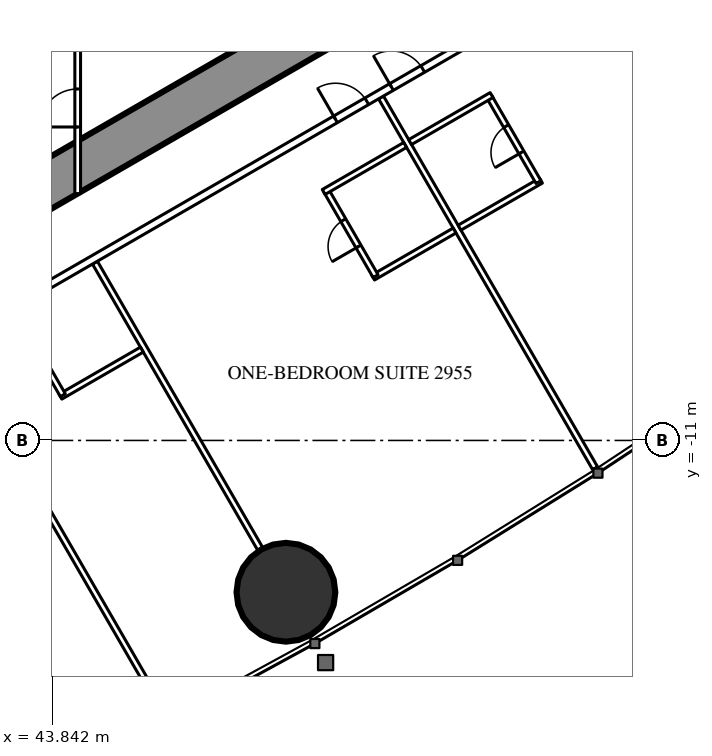
"""IFC4 building model, lengths in metres.
Left out: names, types, materials, properties, quantities, classifications, styles, units other than length and angle.
Written with IfcOpenShell. Run it as: python <this file> out.ifc"""

import sys

from ifc_helpers import new_model, si_unit, direction, frame, frame_2d, origin, origin_2d, place, context, subcontext, project, spatial, rectangle, hollow_circle, extrude, element, fill, save


model = new_model("IFC4")
c1 = context("Model", 3, precision=1e-05, world=origin(), true_north=direction((0.0, 1.0)))
c2 = subcontext(c1, "Body", "Model", "MODEL_VIEW")
j1 = project(units=[si_unit("LENGTHUNIT", "METRE"), si_unit("PLANEANGLEUNIT", "RADIAN")], contexts=[c1])
p1 = place(None, origin())
s1 = spatial("IfcSite", under=j1, at=p1, CompositionType="ELEMENT")
p2 = place(p1, origin())
s2 = spatial("IfcBuilding", under=s1, at=p2, CompositionType="ELEMENT")
p3 = place(p2, frame((0.0, 0.0, 111.6)))
s3 = spatial("IfcBuildingStorey", under=s2, at=p3, CompositionType="ELEMENT", Elevation=111.6)
p4 = place(p3, frame((49.979, -14.994, 0.0), z_axis=(0.0, 0.0, 1.0), x_axis=(1.0, 0.0, 0.0)))
e1 = element("IfcColumn", 1, at=p4, inside=s3, PredefinedType="COLUMN", context=c2, shape_type="SweptSolid", body=[
    extrude(hollow_circle(Radius=1.3, WallThickness=0.1, at=origin_2d()), origin(), (0.0, 0.0, 1.0), 3.5),
])
p5 = place(p3, frame((27.2, -13.8, 0.0), z_axis=(0.0, 0.0, 1.0), x_axis=(0.866027159892, 0.499996958321, 0.0)))
e2 = element("IfcWall", 2, at=p5, inside=s3, PredefinedType="SHEAR", context=c2, shape_type="SweptSolid", body=[
    extrude(rectangle(XDim=27.947, YDim=1.2, at=frame_2d((13.973, 0.0))), origin(), (0.0, 0.0, 1.0), 3.5),
])
p6 = place(p5, frame((4.6, 0.0, 0.0)))
e3 = element("IfcOpeningElement", 3, at=p6, cuts=e2, PredefinedType="OPENING", context=c2, shape_type="SweptSolid", body=[
    extrude(rectangle(XDim=1.0, YDim=2.2, at=frame_2d((0.5, 1.1))), frame((0.0, 0.61, 0.0), z_axis=(0.0, -1.0, 0.0), x_axis=(1.0, 0.0, 0.0)), (0.0, 0.0, 1.0), 1.22),
])
p7 = place(p5, frame((13.395, 0.0, 0.0)))
e4 = element("IfcOpeningElement", 4, at=p7, cuts=e2, PredefinedType="OPENING", context=c2, shape_type="SweptSolid", body=[
    extrude(rectangle(XDim=1.8, YDim=2.2, at=frame_2d((0.9, 1.1))), frame((0.0, 0.61, 0.0), z_axis=(0.0, -1.0, 0.0), x_axis=(1.0, 0.0, 0.0)), (0.0, 0.0, 1.0), 1.22),
])
p8 = place(p3, frame((41.19, -8.494, 0.0), z_axis=(0.0, 0.0, 1.0), x_axis=(0.49999258054, -0.866029687369, 0.0)))
e5 = element("IfcWall", 5, at=p8, inside=s3, PredefinedType="PARTITIONING", context=c2, shape_type="SweptSolid", body=[
    extrude(rectangle(XDim=11.318, YDim=0.15, at=frame_2d((5.659, 0.0))), origin(), (0.0, 0.0, 1.0), 3.25),
])
p9 = place(p3, frame((44.954, -6.321, 0.0), z_axis=(0.0, 0.0, 1.0), x_axis=(0.500018676722, -0.866014620505, 0.0)))
e6 = element("IfcWall", 6, at=p9, inside=s3, PredefinedType="PARTITIONING", context=c2, shape_type="SweptSolid", body=[
    extrude(rectangle(XDim=8.704, YDim=0.15, at=frame_2d((4.352, 0.0))), origin(), (0.0, 0.0, 1.0), 2.2),
])
p10 = place(p3, frame((52.481, -1.975, 0.0), z_axis=(0.0, 0.0, 1.0), x_axis=(0.500003867771, -0.866023170714, 0.0)))
e7 = element("IfcWall", 7, at=p10, inside=s3, PredefinedType="PARTITIONING", context=c2, shape_type="SweptSolid", body=[
    extrude(rectangle(XDim=11.265, YDim=0.15, at=frame_2d((5.632, 0.0))), origin(), (0.0, 0.0, 1.0), 3.25),
])
p11 = place(p3, frame((37.96, -10.243, 0.0), z_axis=(0.0, 0.0, 1.0), x_axis=(0.866026429433, 0.499998223521, 0.0)))
e8 = element("IfcWall", 8, at=p11, inside=s3, PredefinedType="PARTITIONING", context=c2, shape_type="SweptSolid", body=[
    extrude(rectangle(XDim=20.487, YDim=0.2, at=frame_2d((10.243, 0.0))), origin(), (0.0, 0.0, 1.0), 3.25),
])
p12 = place(p11, frame((4.343, 0.0, 0.0)))
e9 = element("IfcOpeningElement", 9, at=p12, cuts=e8, PredefinedType="OPENING", context=c2, shape_type="SweptSolid", body=[
    extrude(rectangle(XDim=0.95, YDim=2.2, at=frame_2d((0.475, 1.1))), frame((0.0, 0.11, 0.0), z_axis=(0.0, -1.0, 0.0), x_axis=(1.0, 0.0, 0.0)), (0.0, 0.0, 1.0), 0.22),
])
p13 = place(p11, frame((15.385, 0.0, 0.0)))
e10 = element("IfcOpeningElement", 10, at=p13, cuts=e8, PredefinedType="OPENING", context=c2, shape_type="SweptSolid", body=[
    extrude(rectangle(XDim=0.95, YDim=2.2, at=frame_2d((0.475, 1.1))), frame((0.0, 0.11, 0.0), z_axis=(0.0, -1.0, 0.0), x_axis=(1.0, 0.0, 0.0)), (0.0, 0.0, 1.0), 0.22),
])
p14 = place(p11, frame((17.085, 0.0, 0.0)))
e11 = element("IfcOpeningElement", 11, at=p14, cuts=e8, PredefinedType="OPENING", context=c2, shape_type="SweptSolid", body=[
    extrude(rectangle(XDim=0.95, YDim=2.2, at=frame_2d((0.475, 1.1))), frame((0.0, 0.11, 0.0), z_axis=(0.0, -1.0, 0.0), x_axis=(1.0, 0.0, 0.0)), (0.0, 0.0, 1.0), 0.22),
])
p15 = place(p11, frame((1.048, 0.0, 0.0)))
e12 = element("IfcOpeningElement", 12, at=p15, cuts=e8, PredefinedType="OPENING", context=c2, shape_type="SweptSolid", body=[
    extrude(rectangle(XDim=1.8, YDim=2.2, at=frame_2d((0.9, 1.1))), frame((0.0, 0.11, 0.0), z_axis=(0.0, -1.0, 0.0), x_axis=(1.0, 0.0, 0.0)), (0.0, 0.0, 1.0), 0.22),
])
p16 = place(p3, frame((44.045, -9.848, 0.0), z_axis=(0.0, 0.0, 1.0), x_axis=(0.866031185235, 0.4999899861, 0.0)))
e13 = element("IfcWall", 13, at=p16, inside=s3, PredefinedType="PARTITIONING", context=c2, shape_type="SweptSolid", body=[
    extrude(rectangle(XDim=2.475, YDim=0.15, at=frame_2d((1.238, 0.0))), origin(), (0.0, 0.0, 1.0), 3.25),
])
p17 = place(p3, frame((42.81, -7.559, 0.0), z_axis=(0.0, 0.0, 1.0), x_axis=(0.499936506574, -0.866062058628, 0.0)))
e14 = element("IfcWall", 14, at=p17, inside=s3, PredefinedType="PARTITIONING", context=c2, shape_type="SweptSolid", body=[
    extrude(rectangle(XDim=2.6, YDim=0.15, at=frame_2d((1.3, 0.0))), origin(), (0.0, 0.0, 1.0), 3.25),
])
p18 = place(p17, frame((0.9, 0.0, 0.0)))
e15 = element("IfcOpeningElement", 15, at=p18, cuts=e14, PredefinedType="OPENING", context=c2, shape_type="SweptSolid", body=[
    extrude(rectangle(XDim=0.8, YDim=2.2, at=frame_2d((0.4, 1.1))), frame((0.0, 0.085, 0.0), z_axis=(0.0, -1.0, 0.0), x_axis=(1.0, 0.0, 0.0)), (0.0, 0.0, 1.0), 0.17),
])
p19 = place(p3, frame((52.273, -6.714, 0.0), z_axis=(0.0, 0.0, 1.0), x_axis=(0.866031185235, 0.4999899861, 0.0)))
e16 = element("IfcWall", 16, at=p19, inside=s3, PredefinedType="PARTITIONING", context=c2, shape_type="SweptSolid", body=[
    extrude(rectangle(XDim=2.475, YDim=0.15, at=frame_2d((1.238, 0.0))), origin(), (0.0, 0.0, 1.0), 3.25),
])
p20 = place(p3, frame((51.038, -4.425, 0.0), z_axis=(0.0, 0.0, 1.0), x_axis=(0.49997716683, -0.86603858612, 0.0)))
e17 = element("IfcWall", 17, at=p20, inside=s3, PredefinedType="PARTITIONING", context=c2, shape_type="SweptSolid", body=[
    extrude(rectangle(XDim=2.6, YDim=0.15, at=frame_2d((1.3, 0.0))), origin(), (0.0, 0.0, 1.0), 3.25),
])
p21 = place(p20, frame((0.9, 0.0, 0.0)))
e18 = element("IfcOpeningElement", 18, at=p21, cuts=e17, PredefinedType="OPENING", context=c2, shape_type="SweptSolid", body=[
    extrude(rectangle(XDim=0.8, YDim=2.2, at=frame_2d((0.4, 1.1))), frame((0.0, 0.085, 0.0), z_axis=(0.0, -1.0, 0.0), x_axis=(1.0, 0.0, 0.0)), (0.0, 0.0, 1.0), 0.17),
])
p22 = place(p3, frame((50.973, -4.462, 0.0), z_axis=(0.0, 0.0, 1.0), x_axis=(0.866031185235, 0.4999899861, 0.0)))
e19 = element("IfcWall", 19, at=p22, inside=s3, PredefinedType="PARTITIONING", context=c2, shape_type="SweptSolid", body=[
    extrude(rectangle(XDim=2.475, YDim=0.15, at=frame_2d((1.238, 0.0))), origin(), (0.0, 0.0, 1.0), 3.25),
])
p23 = place(p3, frame((54.546, -5.402, 0.0), z_axis=(0.0, 0.0, 1.0), x_axis=(0.866006523861, 0.500032699561, 0.0)))
e20 = element("IfcWall", 20, at=p23, inside=s3, PredefinedType="PARTITIONING", context=c2, shape_type="SweptSolid", body=[
    extrude(rectangle(XDim=2.475, YDim=0.15, at=frame_2d((1.237, 0.0))), origin(), (0.0, 0.0, 1.0), 3.25),
])
p24 = place(p3, frame((55.325, -1.95, 0.0), z_axis=(0.0, 0.0, 1.0), x_axis=(0.500006934395, -0.866021400173, 0.0)))
e21 = element("IfcWall", 21, at=p24, inside=s3, PredefinedType="PARTITIONING", context=c2, shape_type="SweptSolid", body=[
    extrude(rectangle(XDim=2.6, YDim=0.15, at=frame_2d((1.3, 0.0))), origin(), (0.0, 0.0, 1.0), 3.25),
])
p25 = place(p24, frame((0.9, 0.0, 0.0)))
e22 = element("IfcOpeningElement", 22, at=p25, cuts=e21, PredefinedType="OPENING", context=c2, shape_type="SweptSolid", body=[
    extrude(rectangle(XDim=0.8, YDim=2.2, at=frame_2d((0.4, 1.1))), frame((0.0, 0.085, 0.0), z_axis=(0.0, -1.0, 0.0), x_axis=(1.0, 0.0, 0.0)), (0.0, 0.0, 1.0), 0.17),
])
p26 = place(p3, frame((53.246, -3.15, 0.0), z_axis=(0.0, 0.0, 1.0), x_axis=(0.866006523861, 0.500032699561, 0.0)))
e23 = element("IfcWall", 23, at=p26, inside=s3, PredefinedType="PARTITIONING", context=c2, shape_type="SweptSolid", body=[
    extrude(rectangle(XDim=2.475, YDim=0.15, at=frame_2d((1.237, 0.0))), origin(), (0.0, 0.0, 1.0), 3.25),
])
p27 = place(p3, frame((44.5, -4.505, 0.0), z_axis=(0.0, 0.0, 1.0), x_axis=(0.0, 1.0, 0.0)))
e24 = element("IfcWall", 24, at=p27, inside=s3, PredefinedType="PARTITIONING", context=c2, shape_type="SweptSolid", body=[
    extrude(rectangle(XDim=9.009, YDim=0.15, at=frame_2d((4.505, 0.0))), origin(), (0.0, 0.0, 1.0), 2.45),
])
p28 = place(p27, frame((1.752, 0.0, 0.0)))
e25 = element("IfcOpeningElement", 25, at=p28, cuts=e24, PredefinedType="OPENING", context=c2, shape_type="SweptSolid", body=[
    extrude(rectangle(XDim=1.0, YDim=2.2, at=frame_2d((0.5, 1.1))), frame((0.0, 0.085, 0.0), z_axis=(0.0, -1.0, 0.0), x_axis=(1.0, 0.0, 0.0)), (0.0, 0.0, 1.0), 0.17),
])
p29 = place(p27, frame((6.257, 0.0, 0.0)))
e26 = element("IfcOpeningElement", 26, at=p29, cuts=e24, PredefinedType="OPENING", context=c2, shape_type="SweptSolid", body=[
    extrude(rectangle(XDim=1.0, YDim=2.2, at=frame_2d((0.5, 1.1))), frame((0.0, 0.085, 0.0), z_axis=(0.0, -1.0, 0.0), x_axis=(1.0, 0.0, 0.0)), (0.0, 0.0, 1.0), 0.17),
])
p30 = place(p21, origin())
e27 = element("IfcDoor", 27, at=p30, inside=s3, OperationType="SINGLE_SWING_RIGHT", PredefinedType="DOOR", context=c2, shape_type="SweptSolid", body=[
    extrude(rectangle(XDim=0.8, YDim=2.2, at=frame_2d((0.4, 1.1))), frame((0.0, 0.025, 0.0), z_axis=(0.0, -1.0, 0.0), x_axis=(1.0, 0.0, 0.0)), (0.0, 0.0, 1.0), 0.05),
])
fill(e18, e27)
p31 = place(p13, origin())
e28 = element("IfcDoor", 28, at=p31, inside=s3, OperationType="SINGLE_SWING_LEFT", PredefinedType="DOOR", context=c2, shape_type="SweptSolid", body=[
    extrude(rectangle(XDim=0.95, YDim=2.2, at=frame_2d((0.475, 1.1))), frame((0.0, 0.025, 0.0), z_axis=(0.0, -1.0, 0.0), x_axis=(1.0, 0.0, 0.0)), (0.0, 0.0, 1.0), 0.05),
])
fill(e10, e28)
p32 = place(p25, origin())
e29 = element("IfcDoor", 29, at=p32, inside=s3, OperationType="SINGLE_SWING_RIGHT", PredefinedType="DOOR", context=c2, shape_type="SweptSolid", body=[
    extrude(rectangle(XDim=0.8, YDim=2.2, at=frame_2d((0.4, 1.1))), frame((0.0, 0.025, 0.0), z_axis=(0.0, -1.0, 0.0), x_axis=(1.0, 0.0, 0.0)), (0.0, 0.0, 1.0), 0.05),
])
fill(e22, e29)
p33 = place(p14, origin())
e30 = element("IfcDoor", 30, at=p33, inside=s3, OperationType="SINGLE_SWING_LEFT", PredefinedType="DOOR", context=c2, shape_type="SweptSolid", body=[
    extrude(rectangle(XDim=0.95, YDim=2.2, at=frame_2d((0.475, 1.1))), frame((0.0, 0.025, 0.0), z_axis=(0.0, -1.0, 0.0), x_axis=(1.0, 0.0, 0.0)), (0.0, 0.0, 1.0), 0.05),
])
fill(e11, e30)
p34 = place(p28, origin())
e31 = element("IfcDoor", 31, at=p34, inside=s3, OperationType="SINGLE_SWING_LEFT", PredefinedType="DOOR", context=c2, shape_type="SweptSolid", body=[
    extrude(rectangle(XDim=1.0, YDim=2.2, at=frame_2d((0.5, 1.1))), frame((0.0, 0.025, 0.0), z_axis=(0.0, -1.0, 0.0), x_axis=(1.0, 0.0, 0.0)), (0.0, 0.0, 1.0), 0.05),
])
fill(e25, e31)
save(model, sys.argv[1])
